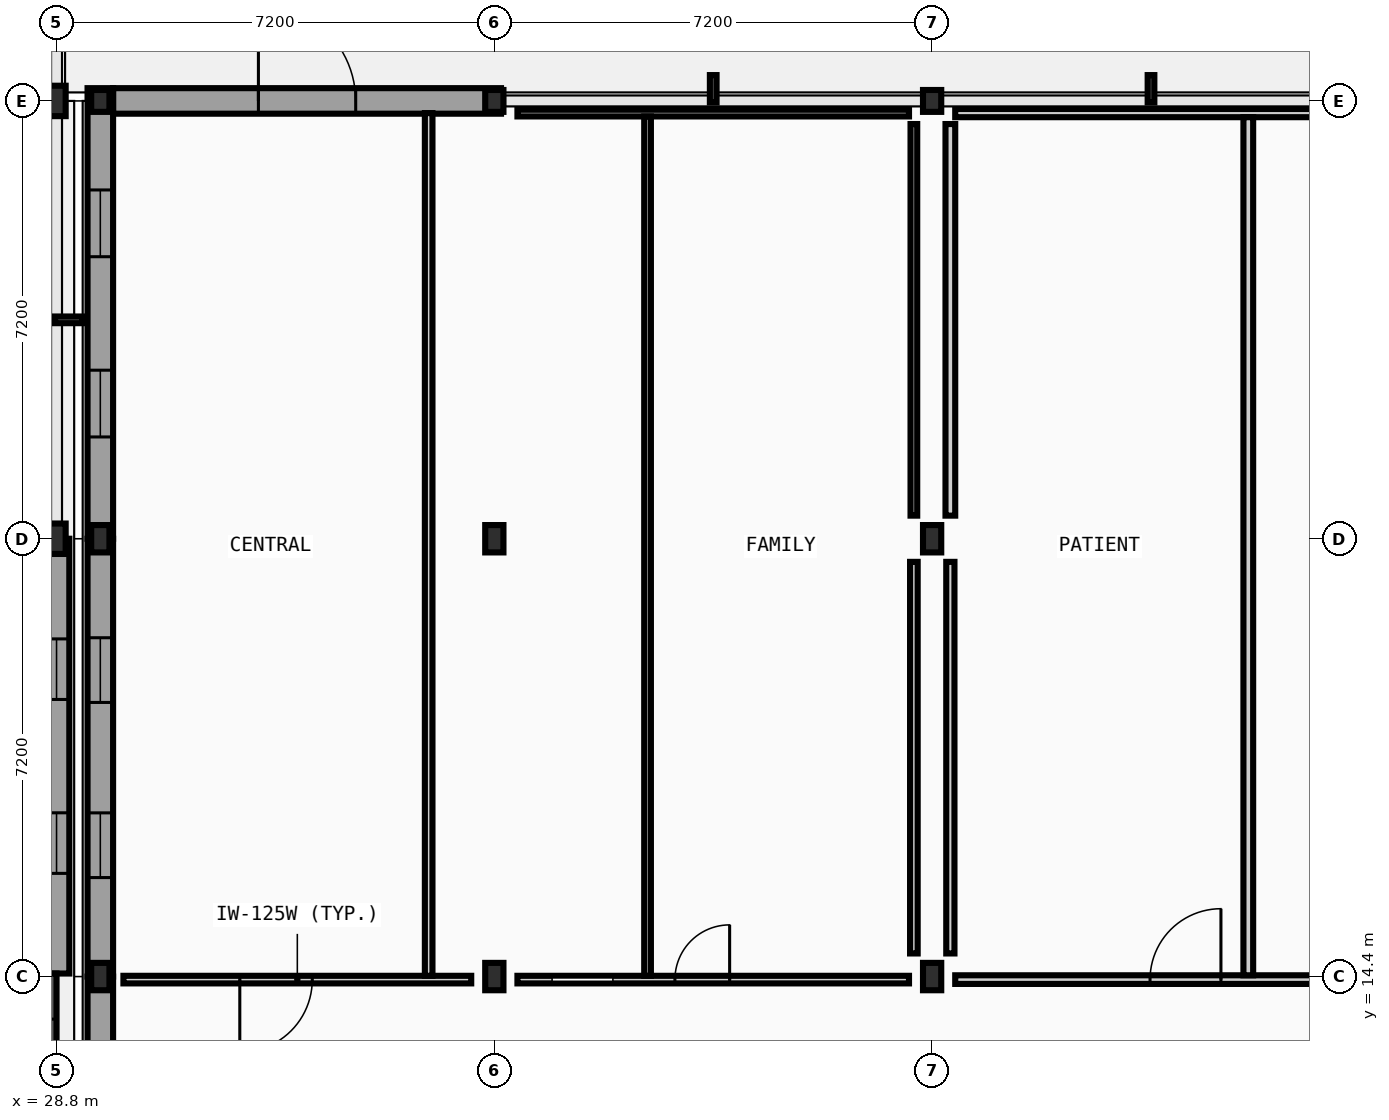
"""IFC4 building model, lengths in metres.
Left out: names, types, materials, properties, quantities, classifications, styles, units other than length and angle.
Written with IfcOpenShell. Run it as: python <this file> out.ifc"""

import sys

from ifc_helpers import new_model, si_unit, direction, frame, frame_2d, origin, origin_2d, place, context, subcontext, project, spatial, rectangle, i_section, extrude, element, fill, save


model = new_model("IFC4")
c1 = context("Model", 3, precision=1e-05, world=origin(), true_north=direction((0.0, 1.0)))
c2 = subcontext(c1, "Body", "Model", "MODEL_VIEW")
j1 = project(units=[si_unit("LENGTHUNIT", "METRE"), si_unit("PLANEANGLEUNIT", "RADIAN")], contexts=[c1])
p1 = place(None, origin())
s1 = spatial("IfcSite", under=j1, at=p1, CompositionType="ELEMENT")
p2 = place(p1, origin())
s2 = spatial("IfcBuilding", under=s1, at=p2, CompositionType="ELEMENT")
p3 = place(p2, origin())
s3 = spatial("IfcBuildingStorey", under=s2, at=p3, CompositionType="ELEMENT", Elevation=0.0)
for number, where, z_axis, x_axis in (
    (1, (28.8, 21.6, 0.0), (0.0, 0.0, 1.0), (1.0, 0.0, 0.0)),
    (2, (28.8, 28.8, 0.0), (0.0, 0.0, 1.0), (1.0, 0.0, 0.0)),
):
    element("IfcColumn", number, at=place(p3, frame(where, z_axis=z_axis, x_axis=x_axis)), inside=s3, PredefinedType="COLUMN", context=c2, shape_type="SweptSolid", body=[
        extrude(i_section(OverallWidth=0.3, OverallDepth=0.5, WebThickness=0.014, FlangeThickness=0.028, FilletRadius=0.027, at=origin_2d()), origin(), (0.0, 0.0, 1.0), 5.2),
    ])
for number, where, z_axis, x_axis in (
    (3, (29.52, 14.4, 0.0), (0.0, 0.0, 1.0), (1.0, 0.0, 0.0)),
    (4, (29.52, 21.6, 0.0), (0.0, 0.0, 1.0), (1.0, 0.0, 0.0)),
):
    element("IfcColumn", number, at=place(p3, frame(where, z_axis=z_axis, x_axis=x_axis)), inside=s3, PredefinedType="COLUMN", context=c2, shape_type="SweptSolid", body=[
        extrude(i_section(OverallWidth=0.3, OverallDepth=0.45, WebThickness=0.014, FlangeThickness=0.026, FilletRadius=0.027, at=origin_2d()), origin(), (0.0, 0.0, 1.0), 5.2),
    ])
p4 = place(p3, frame((29.52, 28.8, 0.0), z_axis=(0.0, 0.0, 1.0), x_axis=(1.0, 0.0, 0.0)))
e5 = element("IfcColumn", 5, at=p4, inside=s3, PredefinedType="COLUMN", context=c2, shape_type="SweptSolid", body=[
    extrude(i_section(OverallWidth=0.3, OverallDepth=0.36, WebThickness=0.012, FlangeThickness=0.022, FilletRadius=0.027, at=origin_2d()), origin(), (0.0, 0.0, 1.0), 5.2),
])
for number, where, z_axis, x_axis in (
    (6, (36.0, 14.4, 0.0), (0.0, 0.0, 1.0), (1.0, 0.0, 0.0)),
    (7, (36.0, 21.6, 0.0), (0.0, 0.0, 1.0), (1.0, 0.0, 0.0)),
):
    element("IfcColumn", number, at=place(p3, frame(where, z_axis=z_axis, x_axis=x_axis)), inside=s3, PredefinedType="COLUMN", context=c2, shape_type="SweptSolid", body=[
        extrude(i_section(OverallWidth=0.3, OverallDepth=0.45, WebThickness=0.014, FlangeThickness=0.026, FilletRadius=0.027, at=origin_2d()), origin(), (0.0, 0.0, 1.0), 5.2),
    ])
p5 = place(p3, frame((36.0, 28.8, 0.0), z_axis=(0.0, 0.0, 1.0), x_axis=(1.0, 0.0, 0.0)))
e8 = element("IfcColumn", 8, at=p5, inside=s3, PredefinedType="COLUMN", context=c2, shape_type="SweptSolid", body=[
    extrude(i_section(OverallWidth=0.3, OverallDepth=0.36, WebThickness=0.012, FlangeThickness=0.022, FilletRadius=0.027, at=origin_2d()), origin(), (0.0, 0.0, 1.0), 5.2),
])
for number, where, z_axis, x_axis in (
    (9, (43.2, 14.4, 0.0), (0.0, 0.0, 1.0), (1.0, 0.0, 0.0)),
    (10, (43.2, 21.6, 0.0), (0.0, 0.0, 1.0), (1.0, 0.0, 0.0)),
):
    element("IfcColumn", number, at=place(p3, frame(where, z_axis=z_axis, x_axis=x_axis)), inside=s3, PredefinedType="COLUMN", context=c2, shape_type="SweptSolid", body=[
        extrude(i_section(OverallWidth=0.3, OverallDepth=0.45, WebThickness=0.014, FlangeThickness=0.026, FilletRadius=0.027, at=origin_2d()), origin(), (0.0, 0.0, 1.0), 5.2),
    ])
p6 = place(p3, frame((43.2, 28.8, 0.0), z_axis=(0.0, 0.0, 1.0), x_axis=(1.0, 0.0, 0.0)))
e11 = element("IfcColumn", 11, at=p6, inside=s3, PredefinedType="COLUMN", context=c2, shape_type="SweptSolid", body=[
    extrude(i_section(OverallWidth=0.3, OverallDepth=0.36, WebThickness=0.012, FlangeThickness=0.022, FilletRadius=0.027, at=origin_2d()), origin(), (0.0, 0.0, 1.0), 5.2),
])
p7 = place(p3, frame((28.8, 14.45, 0.0), z_axis=(0.0, 0.0, 1.0), x_axis=(0.0, 1.0, 0.0)))
e12 = element("IfcWall", 12, at=p7, inside=s3, PredefinedType="STANDARD", context=c2, shape_type="SweptSolid", body=[
    extrude(rectangle(XDim=7.15, YDim=0.42, at=frame_2d((3.575, 0.0))), origin(), (0.0, 0.0, 1.0), 4.97),
])
p8 = place(p7, frame((1.647, 0.0, 0.95)))
e13 = element("IfcOpeningElement", 13, at=p8, cuts=e12, PredefinedType="OPENING", context=c2, shape_type="SweptSolid", body=[
    extrude(rectangle(XDim=0.996, YDim=1.26, at=frame_2d((0.498, 0.63))), frame((0.0, 0.22, 0.0), z_axis=(0.0, -1.0, 0.0), x_axis=(1.0, 0.0, 0.0)), (0.0, 0.0, 1.0), 0.44),
])
p9 = place(p7, frame((4.507, 0.0, 0.95)))
e14 = element("IfcOpeningElement", 14, at=p9, cuts=e12, PredefinedType="OPENING", context=c2, shape_type="SweptSolid", body=[
    extrude(rectangle(XDim=0.996, YDim=1.26, at=frame_2d((0.498, 0.63))), frame((0.0, 0.22, 0.0), z_axis=(0.0, -1.0, 0.0), x_axis=(1.0, 0.0, 0.0)), (0.0, 0.0, 1.0), 0.44),
])
p10 = place(p3, frame((36.11, 28.8, 0.0), z_axis=(0.0, 0.0, 1.0), x_axis=(-1.0, 0.0, 0.0)))
e15 = element("IfcWall", 15, at=p10, inside=s3, PredefinedType="STANDARD", context=c2, shape_type="SweptSolid", body=[
    extrude(rectangle(XDim=6.38, YDim=0.42, at=frame_2d((3.19, 0.0))), origin(), (0.0, 0.0, 1.0), 4.665),
])
p11 = place(p10, frame((2.39, 0.0, 0.0)))
e16 = element("IfcOpeningElement", 16, at=p11, cuts=e15, PredefinedType="OPENING", context=c2, shape_type="SweptSolid", body=[
    extrude(rectangle(XDim=1.6, YDim=2.2, at=frame_2d((0.8, 1.1))), frame((0.0, 0.22, 0.0), z_axis=(0.0, -1.0, 0.0), x_axis=(1.0, 0.0, 0.0)), (0.0, 0.0, 1.0), 0.44),
])
p12 = place(p3, frame((29.52, 14.4, 0.0), z_axis=(0.0, 0.0, 1.0), x_axis=(0.0, -1.0, 0.0)))
e17 = element("IfcWall", 17, at=p12, inside=s3, PredefinedType="STANDARD", context=c2, shape_type="SweptSolid", body=[
    extrude(rectangle(XDim=5.5, YDim=0.42, at=frame_2d((2.75, 0.0))), origin(), (0.0, 0.0, 1.0), 4.97),
])
p13 = place(p3, frame((29.52, 21.6, 0.0), z_axis=(0.0, 0.0, 1.0), x_axis=(0.0, -1.0, 0.0)))
e18 = element("IfcWall", 18, at=p13, inside=s3, PredefinedType="STANDARD", context=c2, shape_type="SweptSolid", body=[
    extrude(rectangle(XDim=7.2, YDim=0.42, at=frame_2d((3.6, 0.0))), origin(), (0.0, 0.0, 1.0), 4.665),
])
p14 = place(p13, frame((1.628, 0.0, 0.95)))
e19 = element("IfcOpeningElement", 19, at=p14, cuts=e18, PredefinedType="OPENING", context=c2, shape_type="SweptSolid", body=[
    extrude(rectangle(XDim=1.064, YDim=1.296, at=frame_2d((0.532, 0.648))), frame((0.0, 0.22, 0.0), z_axis=(0.0, -1.0, 0.0), x_axis=(1.0, 0.0, 0.0)), (0.0, 0.0, 1.0), 0.44),
])
p15 = place(p13, frame((4.508, 0.0, 0.95)))
e20 = element("IfcOpeningElement", 20, at=p15, cuts=e18, PredefinedType="OPENING", context=c2, shape_type="SweptSolid", body=[
    extrude(rectangle(XDim=1.064, YDim=1.296, at=frame_2d((0.532, 0.648))), frame((0.0, 0.22, 0.0), z_axis=(0.0, -1.0, 0.0), x_axis=(1.0, 0.0, 0.0)), (0.0, 0.0, 1.0), 0.44),
])
p16 = place(p3, frame((29.52, 29.01, 0.0), z_axis=(0.0, 0.0, 1.0), x_axis=(0.0, -1.0, 0.0)))
e21 = element("IfcWall", 21, at=p16, inside=s3, PredefinedType="STANDARD", context=c2, shape_type="SweptSolid", body=[
    extrude(rectangle(XDim=7.41, YDim=0.42, at=frame_2d((3.705, 0.0))), origin(), (0.0, 0.0, 1.0), 4.665),
])
p17 = place(p16, frame((1.674, 0.0, 0.95)))
e22 = element("IfcOpeningElement", 22, at=p17, cuts=e21, PredefinedType="OPENING", context=c2, shape_type="SweptSolid", body=[
    extrude(rectangle(XDim=1.098, YDim=1.296, at=frame_2d((0.549, 0.648))), frame((0.0, 0.22, 0.0), z_axis=(0.0, -1.0, 0.0), x_axis=(1.0, 0.0, 0.0)), (0.0, 0.0, 1.0), 0.44),
])
p18 = place(p16, frame((4.638, 0.0, 0.95)))
e23 = element("IfcOpeningElement", 23, at=p18, cuts=e21, PredefinedType="OPENING", context=c2, shape_type="SweptSolid", body=[
    extrude(rectangle(XDim=1.098, YDim=1.296, at=frame_2d((0.549, 0.648))), frame((0.0, 0.22, 0.0), z_axis=(0.0, -1.0, 0.0), x_axis=(1.0, 0.0, 0.0)), (0.0, 0.0, 1.0), 0.44),
])
p19 = place(p3, frame((28.6, 5.85, 0.0), z_axis=(0.0, 0.0, 1.0), x_axis=(0.0, 1.0, 0.0)))
e24 = element("IfcWall", 24, at=p19, inside=s3, PredefinedType="SHEAR", context=c2, shape_type="SweptSolid", body=[
    extrude(rectangle(XDim=8.6, YDim=0.4, at=frame_2d((4.3, 0.0))), origin(), (0.0, 0.0, 1.0), 4.97),
])
p20 = place(p19, frame((6.65, 0.0, 0.0)))
e25 = element("IfcOpeningElement", 25, at=p20, cuts=e24, PredefinedType="OPENING", context=c2, shape_type="SweptSolid", body=[
    extrude(rectangle(XDim=1.2, YDim=2.15, at=frame_2d((0.6, 1.075))), frame((0.0, 0.21, 0.0), z_axis=(0.0, -1.0, 0.0), x_axis=(1.0, 0.0, 0.0)), (0.0, 0.0, 1.0), 0.42),
])
p21 = place(p3, frame((29.9, 14.35, 0.0), z_axis=(0.0, 0.0, 1.0), x_axis=(1.0, 0.0, 0.0)))
e26 = element("IfcWall", 26, at=p21, inside=s3, PredefinedType="PARTITIONING", context=c2, shape_type="SweptSolid", body=[
    extrude(rectangle(XDim=5.72, YDim=0.125, at=frame_2d((2.86, 0.0))), origin(), (0.0, 0.0, 1.0), 4.665),
])
p22 = place(p21, frame((1.914, 0.0, 0.0)))
e27 = element("IfcOpeningElement", 27, at=p22, cuts=e26, PredefinedType="OPENING", context=c2, shape_type="SweptSolid", body=[
    extrude(rectangle(XDim=1.192, YDim=2.068, at=frame_2d((0.596, 1.034))), frame((0.0, 0.073, 0.0), z_axis=(0.0, -1.0, 0.0), x_axis=(1.0, 0.0, 0.0)), (0.0, 0.0, 1.0), 0.145),
])
p23 = place(p3, frame((36.38, 14.35, 0.0), z_axis=(0.0, 0.0, 1.0), x_axis=(1.0, 0.0, 0.0)))
e28 = element("IfcWall", 28, at=p23, inside=s3, PredefinedType="PARTITIONING", context=c2, shape_type="SweptSolid", body=[
    extrude(rectangle(XDim=6.44, YDim=0.125, at=frame_2d((3.22, 0.0))), origin(), (0.0, 0.0, 1.0), 4.665),
])
p24 = place(p23, frame((0.57, 0.0, 0.0)))
e29 = element("IfcOpeningElement", 29, at=p24, cuts=e28, PredefinedType="OPENING", context=c2, shape_type="SweptSolid", body=[
    extrude(rectangle(XDim=1.0, YDim=2.1, at=frame_2d((0.5, 1.05))), frame((0.0, 0.073, 0.0), z_axis=(0.0, -1.0, 0.0), x_axis=(1.0, 0.0, 0.0)), (0.0, 0.0, 1.0), 0.145),
])
p25 = place(p23, frame((2.59, 0.0, 0.0)))
e30 = element("IfcOpeningElement", 30, at=p25, cuts=e28, PredefinedType="OPENING", context=c2, shape_type="SweptSolid", body=[
    extrude(rectangle(XDim=0.9, YDim=2.1, at=frame_2d((0.45, 1.05))), frame((0.0, 0.073, 0.0), z_axis=(0.0, -1.0, 0.0), x_axis=(1.0, 0.0, 0.0)), (0.0, 0.0, 1.0), 0.145),
])
p26 = place(p3, frame((43.58, 14.35, 0.0), z_axis=(0.0, 0.0, 1.0), x_axis=(1.0, 0.0, 0.0)))
e31 = element("IfcWall", 31, at=p26, inside=s3, PredefinedType="PARTITIONING", context=c2, shape_type="SweptSolid", body=[
    extrude(rectangle(XDim=6.44, YDim=0.142, at=frame_2d((3.22, 0.0))), origin(), (0.0, 0.0, 1.0), 4.665),
])
p27 = place(p26, frame((3.204, 0.0, 0.0)))
e32 = element("IfcOpeningElement", 32, at=p27, cuts=e31, PredefinedType="OPENING", context=c2, shape_type="SweptSolid", body=[
    extrude(rectangle(XDim=1.166, YDim=2.068, at=frame_2d((0.583, 1.034))), frame((0.0, 0.081, 0.0), z_axis=(0.0, -1.0, 0.0), x_axis=(1.0, 0.0, 0.0)), (0.0, 0.0, 1.0), 0.162),
])
p28 = place(p3, frame((36.38, 28.6, 0.0), z_axis=(0.0, 0.0, 1.0), x_axis=(1.0, 0.0, 0.0)))
e33 = element("IfcWall", 33, at=p28, inside=s3, PredefinedType="PARTITIONING", context=c2, shape_type="SweptSolid", body=[
    extrude(rectangle(XDim=6.44, YDim=0.11, at=frame_2d((3.22, 0.0))), origin(), (0.0, 0.0, 1.0), 4.665),
])
p29 = place(p3, frame((43.58, 28.6, 0.0), z_axis=(0.0, 0.0, 1.0), x_axis=(1.0, 0.0, 0.0)))
e34 = element("IfcWall", 34, at=p29, inside=s3, PredefinedType="PARTITIONING", context=c2, shape_type="SweptSolid", body=[
    extrude(rectangle(XDim=6.44, YDim=0.135, at=frame_2d((3.22, 0.0))), origin(), (0.0, 0.0, 1.0), 4.665),
])
p30 = place(p3, frame((34.92, 14.413, 0.0), z_axis=(0.0, 0.0, 1.0), x_axis=(0.0, 1.0, 0.0)))
e35 = element("IfcWall", 35, at=p30, inside=s3, PredefinedType="PARTITIONING", context=c2, shape_type="SweptSolid", body=[
    extrude(rectangle(XDim=14.188, YDim=0.125, at=frame_2d((7.094, 0.0))), origin(), (0.0, 0.0, 1.0), 4.97),
])
p31 = place(p3, frame((38.52, 14.413, 0.0), z_axis=(0.0, 0.0, 1.0), x_axis=(0.0, 1.0, 0.0)))
e36 = element("IfcWall", 36, at=p31, inside=s3, PredefinedType="PARTITIONING", context=c2, shape_type="SweptSolid", body=[
    extrude(rectangle(XDim=14.132, YDim=0.11, at=frame_2d((7.066, 0.0))), origin(), (0.0, 0.0, 1.0), 4.655),
])
p32 = place(p3, frame((42.9, 14.78, 0.0), z_axis=(0.0, 0.0, 1.0), x_axis=(0.0, 1.0, 0.0)))
e37 = element("IfcWall", 37, at=p32, inside=s3, PredefinedType="PARTITIONING", context=c2, shape_type="SweptSolid", body=[
    extrude(rectangle(XDim=6.44, YDim=0.125, at=frame_2d((3.22, 0.0))), origin(), (0.0, 0.0, 1.0), 4.97),
])
p33 = place(p3, frame((42.9, 21.98, 0.0), z_axis=(0.0, 0.0, 1.0), x_axis=(0.0, 1.0, 0.0)))
e38 = element("IfcWall", 38, at=p33, inside=s3, PredefinedType="PARTITIONING", context=c2, shape_type="SweptSolid", body=[
    extrude(rectangle(XDim=6.44, YDim=0.11, at=frame_2d((3.22, 0.0))), origin(), (0.0, 0.0, 1.0), 4.97),
])
p34 = place(p3, frame((43.5, 14.78, 0.0), z_axis=(0.0, 0.0, 1.0), x_axis=(0.0, 1.0, 0.0)))
e39 = element("IfcWall", 39, at=p34, inside=s3, PredefinedType="PARTITIONING", context=c2, shape_type="SweptSolid", body=[
    extrude(rectangle(XDim=6.44, YDim=0.135, at=frame_2d((3.22, 0.0))), origin(), (0.0, 0.0, 1.0), 4.97),
])
p35 = place(p3, frame((43.5, 21.98, 0.0), z_axis=(0.0, 0.0, 1.0), x_axis=(0.0, 1.0, 0.0)))
e40 = element("IfcWall", 40, at=p35, inside=s3, PredefinedType="PARTITIONING", context=c2, shape_type="SweptSolid", body=[
    extrude(rectangle(XDim=6.44, YDim=0.16, at=frame_2d((3.22, 0.0))), origin(), (0.0, 0.0, 1.0), 4.665),
])
p36 = place(p3, frame((48.4, 14.421, 0.0), z_axis=(0.0, 0.0, 1.0), x_axis=(0.0, 1.0, 0.0)))
e41 = element("IfcWall", 41, at=p36, inside=s3, PredefinedType="PARTITIONING", context=c2, shape_type="SweptSolid", body=[
    extrude(rectangle(XDim=14.112, YDim=0.16, at=frame_2d((7.056, 0.0))), origin(), (0.0, 0.0, 1.0), 4.97),
])
p37 = place(p8, origin())
e42 = element("IfcWindow", 42, at=p37, inside=s3, PartitioningType="SINGLE_PANEL", PredefinedType="WINDOW", context=c2, shape_type="SweptSolid", body=[
    extrude(rectangle(XDim=0.996, YDim=1.26, at=frame_2d((0.498, 0.63))), frame((0.0, 0.03, 0.0), z_axis=(0.0, -1.0, 0.0), x_axis=(1.0, 0.0, 0.0)), (0.0, 0.0, 1.0), 0.06),
])
fill(e13, e42)
p38 = place(p9, origin())
e43 = element("IfcWindow", 43, at=p38, inside=s3, PartitioningType="SINGLE_PANEL", PredefinedType="WINDOW", context=c2, shape_type="SweptSolid", body=[
    extrude(rectangle(XDim=0.996, YDim=1.26, at=frame_2d((0.498, 0.63))), frame((0.0, 0.03, 0.0), z_axis=(0.0, -1.0, 0.0), x_axis=(1.0, 0.0, 0.0)), (0.0, 0.0, 1.0), 0.06),
])
fill(e14, e43)
p39 = place(p14, origin())
e44 = element("IfcWindow", 44, at=p39, inside=s3, PartitioningType="SINGLE_PANEL", PredefinedType="WINDOW", context=c2, shape_type="SweptSolid", body=[
    extrude(rectangle(XDim=1.064, YDim=1.296, at=frame_2d((0.532, 0.648))), frame((0.0, 0.03, 0.0), z_axis=(0.0, -1.0, 0.0), x_axis=(1.0, 0.0, 0.0)), (0.0, 0.0, 1.0), 0.06),
])
fill(e19, e44)
p40 = place(p15, origin())
e45 = element("IfcWindow", 45, at=p40, inside=s3, PartitioningType="SINGLE_PANEL", PredefinedType="WINDOW", context=c2, shape_type="SweptSolid", body=[
    extrude(rectangle(XDim=1.064, YDim=1.296, at=frame_2d((0.532, 0.648))), frame((0.0, 0.03, 0.0), z_axis=(0.0, -1.0, 0.0), x_axis=(1.0, 0.0, 0.0)), (0.0, 0.0, 1.0), 0.06),
])
fill(e20, e45)
p41 = place(p17, origin())
e46 = element("IfcWindow", 46, at=p41, inside=s3, PartitioningType="SINGLE_PANEL", PredefinedType="WINDOW", context=c2, shape_type="SweptSolid", body=[
    extrude(rectangle(XDim=1.098, YDim=1.296, at=frame_2d((0.549, 0.648))), frame((0.0, 0.03, 0.0), z_axis=(0.0, -1.0, 0.0), x_axis=(1.0, 0.0, 0.0)), (0.0, 0.0, 1.0), 0.06),
])
fill(e22, e46)
p42 = place(p18, origin())
e47 = element("IfcWindow", 47, at=p42, inside=s3, PartitioningType="SINGLE_PANEL", PredefinedType="WINDOW", context=c2, shape_type="SweptSolid", body=[
    extrude(rectangle(XDim=1.098, YDim=1.296, at=frame_2d((0.549, 0.648))), frame((0.0, 0.03, 0.0), z_axis=(0.0, -1.0, 0.0), x_axis=(1.0, 0.0, 0.0)), (0.0, 0.0, 1.0), 0.06),
])
fill(e23, e47)
p43 = place(p11, origin())
e48 = element("IfcDoor", 48, at=p43, inside=s3, OperationType="DOUBLE_DOOR_SINGLE_SWING", PredefinedType="DOOR", context=c2, shape_type="SweptSolid", body=[
    extrude(rectangle(XDim=1.6, YDim=2.2, at=frame_2d((0.8, 1.1))), frame((0.0, 0.025, 0.0), z_axis=(0.0, -1.0, 0.0), x_axis=(1.0, 0.0, 0.0)), (0.0, 0.0, 1.0), 0.05),
])
fill(e16, e48)
p44 = place(p24, frame((1.0, 0.0, 0.0), z_axis=(0.0, 0.0, 1.0), x_axis=(-1.0, 0.0, 0.0)))
e49 = element("IfcDoor", 49, at=p44, inside=s3, OperationType="SLIDING_TO_LEFT", PredefinedType="DOOR", context=c2, shape_type="SweptSolid", body=[
    extrude(rectangle(XDim=1.0, YDim=2.1, at=frame_2d((0.5, 1.05))), frame((0.0, 0.025, 0.0), z_axis=(0.0, -1.0, 0.0), x_axis=(1.0, 0.0, 0.0)), (0.0, 0.0, 1.0), 0.05),
])
fill(e29, e49)
p45 = place(p25, frame((0.9, 0.0, 0.0), z_axis=(0.0, 0.0, 1.0), x_axis=(-1.0, 0.0, 0.0)))
e50 = element("IfcDoor", 50, at=p45, inside=s3, OperationType="SINGLE_SWING_RIGHT", PredefinedType="DOOR", context=c2, shape_type="SweptSolid", body=[
    extrude(rectangle(XDim=0.9, YDim=2.1, at=frame_2d((0.45, 1.05))), frame((0.0, 0.025, 0.0), z_axis=(0.0, -1.0, 0.0), x_axis=(1.0, 0.0, 0.0)), (0.0, 0.0, 1.0), 0.05),
])
fill(e30, e50)
p46 = place(p27, frame((1.166, 0.0, 0.0), z_axis=(0.0, 0.0, 1.0), x_axis=(-1.0, 0.0, 0.0)))
e51 = element("IfcDoor", 51, at=p46, inside=s3, OperationType="SINGLE_SWING_RIGHT", PredefinedType="DOOR", context=c2, shape_type="SweptSolid", body=[
    extrude(rectangle(XDim=1.166, YDim=2.068, at=frame_2d((0.583, 1.034))), frame((0.0, 0.025, 0.0), z_axis=(0.0, -1.0, 0.0), x_axis=(1.0, 0.0, 0.0)), (0.0, 0.0, 1.0), 0.05),
])
fill(e32, e51)
p47 = place(p22, frame((1.192, 0.0, 0.0), z_axis=(0.0, 0.0, 1.0), x_axis=(-1.0, 0.0, 0.0)))
e52 = element("IfcDoor", 52, at=p47, inside=s3, OperationType="SINGLE_SWING_LEFT", PredefinedType="DOOR", context=c2, shape_type="SweptSolid", body=[
    extrude(rectangle(XDim=1.192, YDim=2.068, at=frame_2d((0.596, 1.034))), frame((0.0, 0.025, 0.0), z_axis=(0.0, -1.0, 0.0), x_axis=(1.0, 0.0, 0.0)), (0.0, 0.0, 1.0), 0.05),
])
fill(e27, e52)
save(model, sys.argv[1])
